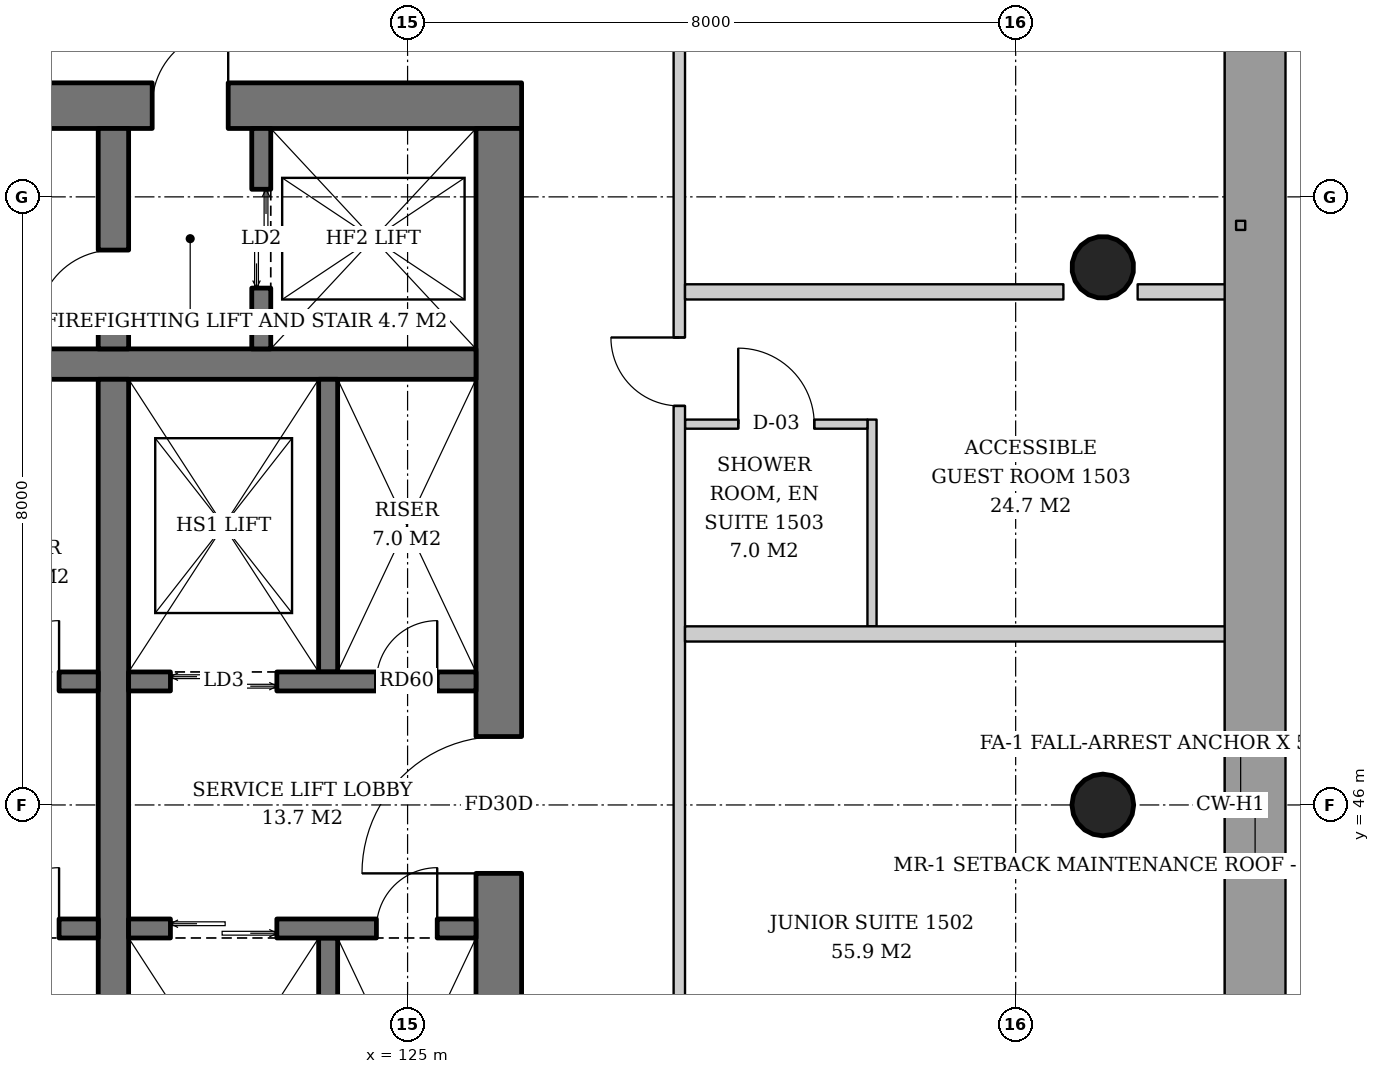
"""IFC4 building model, lengths in metres.
Left out: names, types, materials, properties, quantities, classifications, styles, units other than length and angle.
Written with IfcOpenShell. Run it as: python <this file> out.ifc"""

import sys

from ifc_helpers import new_model, si_unit, direction, frame, frame_2d, origin, origin_2d, place, context, subcontext, project, spatial, rectangle, hollow_circle, extrude, element, fill, save


model = new_model("IFC4")
c1 = context("Model", 3, precision=1e-05, world=origin(), true_north=direction((0.0, 1.0)))
c2 = subcontext(c1, "Body", "Model", "MODEL_VIEW")
j1 = project(units=[si_unit("LENGTHUNIT", "METRE"), si_unit("PLANEANGLEUNIT", "RADIAN")], contexts=[c1])
p1 = place(None, origin())
s1 = spatial("IfcSite", under=j1, at=p1, CompositionType="ELEMENT")
p2 = place(p1, origin())
s2 = spatial("IfcBuilding", under=s1, at=p2, CompositionType="ELEMENT")
p3 = place(p2, frame((0.0, 0.0, 62.8)))
s3 = spatial("IfcBuildingStorey", under=s2, at=p3, CompositionType="ELEMENT", Elevation=62.8)
p4 = place(p3, frame((134.198, 46.0, 0.0), z_axis=(-0.043069538298, 0.0, 0.999072076915), x_axis=(0.0, -1.0, 0.0)))
e1 = element("IfcColumn", 1, at=p4, inside=s3, PredefinedType="COLUMN", context=c2, shape_type="SweptSolid", body=[
    extrude(hollow_circle(Radius=0.406, WallThickness=0.03, at=origin_2d()), origin(), (0.0, 0.0, 1.0), 3.803),
])
p5 = place(p3, frame((134.198, 53.099, 0.0), z_axis=(-0.043059584825, -0.021497706284, 0.998841188968), x_axis=(0.446680166538, -0.894693706707, 0.0)))
e2 = element("IfcColumn", 2, at=p5, inside=s3, PredefinedType="COLUMN", context=c2, shape_type="SweptSolid", body=[
    extrude(hollow_circle(Radius=0.406, WallThickness=0.03, at=origin_2d()), origin(), (0.0, 0.0, 1.0), 3.804),
])
p6 = place(p3, frame((107.5, 55.2, 0.0), z_axis=(0.0, 0.0, 1.0), x_axis=(1.0, 0.0, 0.0)))
e3 = element("IfcWall", 3, at=p6, inside=s3, PredefinedType="SHEAR", context=c2, shape_type="SweptSolid", body=[
    extrude(rectangle(XDim=19.0, YDim=0.6, at=frame_2d((9.5, 0.0))), origin(), (0.0, 0.0, 1.0), 3.8),
])
p7 = place(p6, frame((14.14, 0.0, 0.0)))
e4 = element("IfcOpeningElement", 4, at=p7, cuts=e3, PredefinedType="OPENING", context=c2, shape_type="SweptSolid", body=[
    extrude(rectangle(XDim=1.0, YDim=2.1, at=frame_2d((0.5, 1.05))), frame((0.0, 0.31, 0.0), z_axis=(0.0, -1.0, 0.0), x_axis=(1.0, 0.0, 0.0)), (0.0, 0.0, 1.0), 0.62),
])
p8 = place(p6, frame((1.024, 0.0, 0.0)))
e5 = element("IfcOpeningElement", 5, at=p8, cuts=e3, PredefinedType="OPENING", context=c2, shape_type="SweptSolid", body=[
    extrude(rectangle(XDim=1.0, YDim=2.1, at=frame_2d((0.5, 1.05))), frame((0.0, 0.31, 0.0), z_axis=(0.0, -1.0, 0.0), x_axis=(1.0, 0.0, 0.0)), (0.0, 0.0, 1.0), 0.62),
])
p9 = place(p6, frame((3.262, 0.0, 0.0)))
e6 = element("IfcOpeningElement", 6, at=p9, cuts=e3, PredefinedType="OPENING", context=c2, shape_type="SweptSolid", body=[
    extrude(rectangle(XDim=1.0, YDim=2.1, at=frame_2d((0.5, 1.05))), frame((0.0, 0.31, 0.0), z_axis=(0.0, -1.0, 0.0), x_axis=(1.0, 0.0, 0.0)), (0.0, 0.0, 1.0), 0.62),
])
p10 = place(p3, frame((126.2, 37.1, 0.0), z_axis=(0.0, 0.0, 1.0), x_axis=(0.0, 1.0, 0.0)))
e7 = element("IfcWall", 7, at=p10, inside=s3, PredefinedType="SHEAR", context=c2, shape_type="SweptSolid", body=[
    extrude(rectangle(XDim=17.8, YDim=0.6, at=frame_2d((8.9, 0.0))), origin(), (0.0, 0.0, 1.0), 3.8),
])
p11 = place(p10, frame((8.0, 0.0, 0.0)))
e8 = element("IfcOpeningElement", 8, at=p11, cuts=e7, PredefinedType="OPENING", context=c2, shape_type="SweptSolid", body=[
    extrude(rectangle(XDim=1.8, YDim=2.4, at=frame_2d((0.9, 1.2))), frame((0.0, 0.31, 0.0), z_axis=(0.0, -1.0, 0.0), x_axis=(1.0, 0.0, 0.0)), (0.0, 0.0, 1.0), 0.62),
])
p12 = place(p3, frame((108.1, 51.8, 0.0), z_axis=(0.0, 0.0, 1.0), x_axis=(1.0, 0.0, 0.0)))
e9 = element("IfcWall", 9, at=p12, inside=s3, PredefinedType="SHEAR", context=c2, shape_type="SweptSolid", body=[
    extrude(rectangle(XDim=17.8, YDim=0.4, at=frame_2d((8.9, 0.0))), origin(), (0.0, 0.0, 1.0), 3.8),
])
p13 = place(p3, frame((121.13, 40.4, 0.0), z_axis=(0.0, 0.0, 1.0), x_axis=(0.0, 1.0, 0.0)))
e10 = element("IfcWall", 10, at=p13, inside=s3, PredefinedType="SHEAR", context=c2, shape_type="SweptSolid", body=[
    extrude(rectangle(XDim=11.2, YDim=0.4, at=frame_2d((5.6, 0.0))), origin(), (0.0, 0.0, 1.0), 3.8),
])
p14 = place(p3, frame((121.13, 52.0, 0.0), z_axis=(0.0, 0.0, 1.0), x_axis=(0.0, 1.0, 0.0)))
e11 = element("IfcWall", 11, at=p14, inside=s3, PredefinedType="SHEAR", context=c2, shape_type="SweptSolid", body=[
    extrude(rectangle(XDim=2.9, YDim=0.4, at=frame_2d((1.45, 0.0))), origin(), (0.0, 0.0, 1.0), 3.8),
])
p15 = place(p14, frame((0.3, 0.0, 0.0)))
e12 = element("IfcOpeningElement", 12, at=p15, cuts=e11, PredefinedType="OPENING", context=c2, shape_type="SweptSolid", body=[
    extrude(rectangle(XDim=1.0, YDim=2.1, at=frame_2d((0.5, 1.05))), frame((0.0, 0.21, 0.0), z_axis=(0.0, -1.0, 0.0), x_axis=(1.0, 0.0, 0.0)), (0.0, 0.0, 1.0), 0.42),
])
p16 = place(p3, frame((123.075, 52.0, 0.0), z_axis=(0.0, 0.0, 1.0), x_axis=(0.0, 1.0, 0.0)))
e13 = element("IfcWall", 13, at=p16, inside=s3, PredefinedType="SHEAR", context=c2, shape_type="SweptSolid", body=[
    extrude(rectangle(XDim=2.9, YDim=0.25, at=frame_2d((1.45, 0.0))), origin(), (0.0, 0.0, 1.0), 3.8),
])
p17 = place(p16, frame((0.8, 0.0, 0.0)))
e14 = element("IfcOpeningElement", 14, at=p17, cuts=e13, PredefinedType="OPENING", context=c2, shape_type="SweptSolid", body=[
    extrude(rectangle(XDim=1.3, YDim=2.2, at=frame_2d((0.65, 1.1))), frame((0.0, 0.135, 0.0), z_axis=(0.0, -1.0, 0.0), x_axis=(1.0, 0.0, 0.0)), (0.0, 0.0, 1.0), 0.27),
])
p18 = place(p3, frame((108.1, 47.625, 0.0), z_axis=(0.0, 0.0, 1.0), x_axis=(1.0, 0.0, 0.0)))
e15 = element("IfcWall", 15, at=p18, inside=s3, PredefinedType="SHEAR", context=c2, shape_type="SweptSolid", body=[
    extrude(rectangle(XDim=12.83, YDim=0.25, at=frame_2d((6.415, 0.0))), origin(), (0.0, 0.0, 1.0), 3.8),
])
p19 = place(p18, frame((0.7, 0.0, 0.0)))
e16 = element("IfcOpeningElement", 16, at=p19, cuts=e15, PredefinedType="OPENING", context=c2, shape_type="SweptSolid", body=[
    extrude(rectangle(XDim=1.1, YDim=2.2, at=frame_2d((0.55, 1.1))), frame((0.0, 0.135, 0.0), z_axis=(0.0, -1.0, 0.0), x_axis=(1.0, 0.0, 0.0)), (0.0, 0.0, 1.0), 0.27),
])
p20 = place(p18, frame((3.45, 0.0, 0.0)))
e17 = element("IfcOpeningElement", 17, at=p20, cuts=e15, PredefinedType="OPENING", context=c2, shape_type="SweptSolid", body=[
    extrude(rectangle(XDim=1.1, YDim=2.2, at=frame_2d((0.55, 1.1))), frame((0.0, 0.135, 0.0), z_axis=(0.0, -1.0, 0.0), x_axis=(1.0, 0.0, 0.0)), (0.0, 0.0, 1.0), 0.27),
])
p21 = place(p18, frame((6.2, 0.0, 0.0)))
e18 = element("IfcOpeningElement", 18, at=p21, cuts=e15, PredefinedType="OPENING", context=c2, shape_type="SweptSolid", body=[
    extrude(rectangle(XDim=1.1, YDim=2.2, at=frame_2d((0.55, 1.1))), frame((0.0, 0.135, 0.0), z_axis=(0.0, -1.0, 0.0), x_axis=(1.0, 0.0, 0.0)), (0.0, 0.0, 1.0), 0.27),
])
p22 = place(p18, frame((8.95, 0.0, 0.0)))
e19 = element("IfcOpeningElement", 19, at=p22, cuts=e15, PredefinedType="OPENING", context=c2, shape_type="SweptSolid", body=[
    extrude(rectangle(XDim=1.1, YDim=2.2, at=frame_2d((0.55, 1.1))), frame((0.0, 0.135, 0.0), z_axis=(0.0, -1.0, 0.0), x_axis=(1.0, 0.0, 0.0)), (0.0, 0.0, 1.0), 0.27),
])
p23 = place(p18, frame((11.515, 0.0, 0.0)))
e20 = element("IfcOpeningElement", 20, at=p23, cuts=e15, PredefinedType="OPENING", context=c2, shape_type="SweptSolid", body=[
    extrude(rectangle(XDim=0.8, YDim=2.0, at=frame_2d((0.4, 1.0))), frame((0.0, 0.135, 0.0), z_axis=(0.0, -1.0, 0.0), x_axis=(1.0, 0.0, 0.0)), (0.0, 0.0, 1.0), 0.27),
])
p24 = place(p3, frame((108.1, 44.375, 0.0), z_axis=(0.0, 0.0, 1.0), x_axis=(1.0, 0.0, 0.0)))
e21 = element("IfcWall", 21, at=p24, inside=s3, PredefinedType="SHEAR", context=c2, shape_type="SweptSolid", body=[
    extrude(rectangle(XDim=12.83, YDim=0.25, at=frame_2d((6.415, 0.0))), origin(), (0.0, 0.0, 1.0), 3.8),
])
p25 = place(p24, frame((0.7, 0.0, 0.0)))
e22 = element("IfcOpeningElement", 22, at=p25, cuts=e21, PredefinedType="OPENING", context=c2, shape_type="SweptSolid", body=[
    extrude(rectangle(XDim=1.1, YDim=2.2, at=frame_2d((0.55, 1.1))), frame((0.0, 0.135, 0.0), z_axis=(0.0, -1.0, 0.0), x_axis=(1.0, 0.0, 0.0)), (0.0, 0.0, 1.0), 0.27),
])
p26 = place(p24, frame((3.45, 0.0, 0.0)))
e23 = element("IfcOpeningElement", 23, at=p26, cuts=e21, PredefinedType="OPENING", context=c2, shape_type="SweptSolid", body=[
    extrude(rectangle(XDim=1.1, YDim=2.2, at=frame_2d((0.55, 1.1))), frame((0.0, 0.135, 0.0), z_axis=(0.0, -1.0, 0.0), x_axis=(1.0, 0.0, 0.0)), (0.0, 0.0, 1.0), 0.27),
])
p27 = place(p24, frame((6.2, 0.0, 0.0)))
e24 = element("IfcOpeningElement", 24, at=p27, cuts=e21, PredefinedType="OPENING", context=c2, shape_type="SweptSolid", body=[
    extrude(rectangle(XDim=1.1, YDim=2.2, at=frame_2d((0.55, 1.1))), frame((0.0, 0.135, 0.0), z_axis=(0.0, -1.0, 0.0), x_axis=(1.0, 0.0, 0.0)), (0.0, 0.0, 1.0), 0.27),
])
p28 = place(p24, frame((9.0, 0.0, 0.0)))
e25 = element("IfcOpeningElement", 25, at=p28, cuts=e21, PredefinedType="OPENING", context=c2, shape_type="SweptSolid", body=[
    extrude(rectangle(XDim=1.0, YDim=2.1, at=frame_2d((0.5, 1.05))), frame((0.0, 0.135, 0.0), z_axis=(0.0, -1.0, 0.0), x_axis=(1.0, 0.0, 0.0)), (0.0, 0.0, 1.0), 0.27),
])
p29 = place(p24, frame((11.515, 0.0, 0.0)))
e26 = element("IfcOpeningElement", 26, at=p29, cuts=e21, PredefinedType="OPENING", context=c2, shape_type="SweptSolid", body=[
    extrude(rectangle(XDim=0.8, YDim=2.0, at=frame_2d((0.4, 1.0))), frame((0.0, 0.135, 0.0), z_axis=(0.0, -1.0, 0.0), x_axis=(1.0, 0.0, 0.0)), (0.0, 0.0, 1.0), 0.27),
])
p30 = place(p3, frame((123.955, 47.75, 0.0), z_axis=(0.0, 0.0, 1.0), x_axis=(0.0, 1.0, 0.0)))
e27 = element("IfcWall", 27, at=p30, inside=s3, PredefinedType="SHEAR", context=c2, shape_type="SweptSolid", body=[
    extrude(rectangle(XDim=3.85, YDim=0.25, at=frame_2d((1.925, 0.0))), origin(), (0.0, 0.0, 1.0), 3.8),
])
p31 = place(p3, frame((121.33, 47.625, 0.0), z_axis=(0.0, 0.0, 1.0), x_axis=(1.0, 0.0, 0.0)))
e28 = element("IfcWall", 28, at=p31, inside=s3, PredefinedType="SHEAR", context=c2, shape_type="SweptSolid", body=[
    extrude(rectangle(XDim=4.57, YDim=0.25, at=frame_2d((2.285, 0.0))), origin(), (0.0, 0.0, 1.0), 3.8),
])
p32 = place(p31, frame((0.55, 0.0, 0.0)))
e29 = element("IfcOpeningElement", 29, at=p32, cuts=e28, PredefinedType="OPENING", context=c2, shape_type="SweptSolid", body=[
    extrude(rectangle(XDim=1.4, YDim=2.4, at=frame_2d((0.7, 1.2))), frame((0.0, 0.135, 0.0), z_axis=(0.0, -1.0, 0.0), x_axis=(1.0, 0.0, 0.0)), (0.0, 0.0, 1.0), 0.27),
])
p33 = place(p31, frame((3.26, 0.0, 0.0)))
e30 = element("IfcOpeningElement", 30, at=p33, cuts=e28, PredefinedType="OPENING", context=c2, shape_type="SweptSolid", body=[
    extrude(rectangle(XDim=0.8, YDim=2.0, at=frame_2d((0.4, 1.0))), frame((0.0, 0.135, 0.0), z_axis=(0.0, -1.0, 0.0), x_axis=(1.0, 0.0, 0.0)), (0.0, 0.0, 1.0), 0.27),
])
p34 = place(p3, frame((123.955, 44.25, 0.0), z_axis=(0.0, 0.0, 1.0), x_axis=(0.0, -1.0, 0.0)))
e31 = element("IfcWall", 31, at=p34, inside=s3, PredefinedType="SHEAR", context=c2, shape_type="SweptSolid", body=[
    extrude(rectangle(XDim=3.85, YDim=0.25, at=frame_2d((1.925, 0.0))), origin(), (0.0, 0.0, 1.0), 3.8),
])
p35 = place(p3, frame((121.33, 44.375, 0.0), z_axis=(0.0, 0.0, 1.0), x_axis=(1.0, 0.0, 0.0)))
e32 = element("IfcWall", 32, at=p35, inside=s3, PredefinedType="SHEAR", context=c2, shape_type="SweptSolid", body=[
    extrude(rectangle(XDim=4.57, YDim=0.25, at=frame_2d((2.285, 0.0))), origin(), (0.0, 0.0, 1.0), 3.8),
])
p36 = place(p35, frame((0.55, 0.0, 0.0)))
e33 = element("IfcOpeningElement", 33, at=p36, cuts=e32, PredefinedType="OPENING", context=c2, shape_type="SweptSolid", body=[
    extrude(rectangle(XDim=1.4, YDim=2.4, at=frame_2d((0.7, 1.2))), frame((0.0, 0.135, 0.0), z_axis=(0.0, -1.0, 0.0), x_axis=(1.0, 0.0, 0.0)), (0.0, 0.0, 1.0), 0.27),
])
p37 = place(p35, frame((3.26, 0.0, 0.0)))
e34 = element("IfcOpeningElement", 34, at=p37, cuts=e32, PredefinedType="OPENING", context=c2, shape_type="SweptSolid", body=[
    extrude(rectangle(XDim=0.8, YDim=2.0, at=frame_2d((0.4, 1.0))), frame((0.0, 0.135, 0.0), z_axis=(0.0, -1.0, 0.0), x_axis=(1.0, 0.0, 0.0)), (0.0, 0.0, 1.0), 0.27),
])
p38 = place(p3, frame((131.11, 48.35, 0.0), z_axis=(0.0, 0.0, 1.0), x_axis=(0.0, 1.0, 0.0)))
e35 = element("IfcWall", 35, at=p38, inside=s3, PredefinedType="PARTITIONING", context=c2, shape_type="SweptSolid", body=[
    extrude(rectangle(XDim=2.72, YDim=0.12, at=frame_2d((1.36, 0.0))), origin(), (0.0, 0.0, 1.0), 2.847),
])
p39 = place(p3, frame((128.65, 51.01, 0.0), z_axis=(0.0, 0.0, 1.0), x_axis=(1.0, 0.0, 0.0)))
e36 = element("IfcWall", 36, at=p39, inside=s3, PredefinedType="PARTITIONING", context=c2, shape_type="SweptSolid", body=[
    extrude(rectangle(XDim=2.4, YDim=0.12, at=frame_2d((1.2, 0.0))), origin(), (0.0, 0.0, 1.0), 3.6),
])
p40 = place(p39, frame((0.7, 0.0, 0.0)))
e37 = element("IfcOpeningElement", 37, at=p40, cuts=e36, PredefinedType="OPENING", context=c2, shape_type="SweptSolid", body=[
    extrude(rectangle(XDim=1.0, YDim=2.1, at=frame_2d((0.5, 1.05))), frame((0.0, 0.07, 0.0), z_axis=(0.0, -1.0, 0.0), x_axis=(1.0, 0.0, 0.0)), (0.0, 0.0, 1.0), 0.14),
])
p41 = place(p3, frame((128.575, 34.35, 0.0), z_axis=(0.0, 0.0, 1.0), x_axis=(0.0, 1.0, 0.0)))
e38 = element("IfcWall", 38, at=p41, inside=s3, PredefinedType="PARTITIONING", context=c2, shape_type="SweptSolid", body=[
    extrude(rectangle(XDim=23.15, YDim=0.15, at=frame_2d((11.575, 0.0))), origin(), (0.0, 0.0, 1.0), 2.8),
])
p42 = place(p41, frame((2.025, 0.0, 0.0)))
e39 = element("IfcOpeningElement", 39, at=p42, cuts=e38, PredefinedType="OPENING", context=c2, shape_type="SweptSolid", body=[
    extrude(rectangle(XDim=0.9, YDim=2.1, at=frame_2d((0.45, 1.05))), frame((0.0, 0.085, 0.0), z_axis=(0.0, -1.0, 0.0), x_axis=(1.0, 0.0, 0.0)), (0.0, 0.0, 1.0), 0.17),
])
p43 = place(p41, frame((7.65, 0.0, 0.0)))
e40 = element("IfcOpeningElement", 40, at=p43, cuts=e38, PredefinedType="OPENING", context=c2, shape_type="SweptSolid", body=[
    extrude(rectangle(XDim=0.9, YDim=2.1, at=frame_2d((0.45, 1.05))), frame((0.0, 0.085, 0.0), z_axis=(0.0, -1.0, 0.0), x_axis=(1.0, 0.0, 0.0)), (0.0, 0.0, 1.0), 0.17),
])
p44 = place(p41, frame((16.9, 0.0, 0.0)))
e41 = element("IfcOpeningElement", 41, at=p44, cuts=e38, PredefinedType="OPENING", context=c2, shape_type="SweptSolid", body=[
    extrude(rectangle(XDim=0.9, YDim=2.1, at=frame_2d((0.45, 1.05))), frame((0.0, 0.085, 0.0), z_axis=(0.0, -1.0, 0.0), x_axis=(1.0, 0.0, 0.0)), (0.0, 0.0, 1.0), 0.17),
])
p45 = place(p3, frame((128.65, 48.25, 0.0), z_axis=(0.0, 0.0, 1.0), x_axis=(1.0, 0.0, 0.0)))
e42 = element("IfcWall", 42, at=p45, inside=s3, PredefinedType="PARTITIONING", context=c2, shape_type="SweptSolid", body=[
    extrude(rectangle(XDim=7.14, YDim=0.2, at=frame_2d((3.57, 0.0))), origin(), (0.0, 0.0, 1.0), 3.05),
])
p46 = place(p3, frame((128.65, 52.75, 0.0), z_axis=(0.0, 0.0, 1.0), x_axis=(1.0, 0.0, 0.0)))
e43 = element("IfcWall", 43, at=p46, inside=s3, PredefinedType="PARTITIONING", context=c2, shape_type="SweptSolid", body=[
    extrude(rectangle(XDim=4.978, YDim=0.2, at=frame_2d((2.489, 0.0))), origin(), (0.0, 0.0, 1.0), 3.6),
])
p47 = place(p3, frame((134.605, 52.75, 0.0), z_axis=(0.0, 0.0, 1.0), x_axis=(1.0, 0.0, 0.0)))
e44 = element("IfcWall", 44, at=p47, inside=s3, PredefinedType="PARTITIONING", context=c2, shape_type="SweptSolid", body=[
    extrude(rectangle(XDim=1.185, YDim=0.2, at=frame_2d((0.593, 0.0))), origin(), (0.0, 0.0, 1.0), 3.6),
])
p48 = place(p17, origin())
e45 = element("IfcDoor", 45, at=p48, inside=s3, OperationType="DOUBLE_DOOR_SLIDING", PredefinedType="DOOR", context=c2, shape_type="SweptSolid", body=[
    extrude(rectangle(XDim=1.3, YDim=2.2, at=frame_2d((0.65, 1.1))), frame((0.0, 0.025, 0.0), z_axis=(0.0, -1.0, 0.0), x_axis=(1.0, 0.0, 0.0)), (0.0, 0.0, 1.0), 0.05),
])
fill(e14, e45)
p49 = place(p23, origin())
e46 = element("IfcDoor", 46, at=p49, inside=s3, OperationType="SINGLE_SWING_RIGHT", PredefinedType="DOOR", context=c2, shape_type="SweptSolid", body=[
    extrude(rectangle(XDim=0.8, YDim=2.0, at=frame_2d((0.4, 1.0))), frame((0.0, 0.025, 0.0), z_axis=(0.0, -1.0, 0.0), x_axis=(1.0, 0.0, 0.0)), (0.0, 0.0, 1.0), 0.05),
])
fill(e20, e46)
p50 = place(p29, origin())
e47 = element("IfcDoor", 47, at=p50, inside=s3, OperationType="SINGLE_SWING_RIGHT", PredefinedType="DOOR", context=c2, shape_type="SweptSolid", body=[
    extrude(rectangle(XDim=0.8, YDim=2.0, at=frame_2d((0.4, 1.0))), frame((0.0, 0.025, 0.0), z_axis=(0.0, -1.0, 0.0), x_axis=(1.0, 0.0, 0.0)), (0.0, 0.0, 1.0), 0.05),
])
fill(e26, e47)
p51 = place(p32, origin())
e48 = element("IfcDoor", 48, at=p51, inside=s3, OperationType="DOUBLE_DOOR_SLIDING", PredefinedType="DOOR", context=c2, shape_type="SweptSolid", body=[
    extrude(rectangle(XDim=1.4, YDim=2.4, at=frame_2d((0.7, 1.2))), frame((0.0, 0.025, 0.0), z_axis=(0.0, -1.0, 0.0), x_axis=(1.0, 0.0, 0.0)), (0.0, 0.0, 1.0), 0.05),
])
fill(e29, e48)
p52 = place(p33, origin())
e49 = element("IfcDoor", 49, at=p52, inside=s3, OperationType="SINGLE_SWING_RIGHT", PredefinedType="DOOR", context=c2, shape_type="SweptSolid", body=[
    extrude(rectangle(XDim=0.8, YDim=2.0, at=frame_2d((0.4, 1.0))), frame((0.0, 0.025, 0.0), z_axis=(0.0, -1.0, 0.0), x_axis=(1.0, 0.0, 0.0)), (0.0, 0.0, 1.0), 0.05),
])
fill(e30, e49)
p53 = place(p36, origin())
e50 = element("IfcDoor", 50, at=p53, inside=s3, OperationType="DOUBLE_DOOR_SLIDING", PredefinedType="DOOR", context=c2, shape_type="SweptSolid", body=[
    extrude(rectangle(XDim=1.4, YDim=2.4, at=frame_2d((0.7, 1.2))), frame((0.0, 0.025, 0.0), z_axis=(0.0, -1.0, 0.0), x_axis=(1.0, 0.0, 0.0)), (0.0, 0.0, 1.0), 0.05),
])
fill(e33, e50)
p54 = place(p37, origin())
e51 = element("IfcDoor", 51, at=p54, inside=s3, OperationType="SINGLE_SWING_RIGHT", PredefinedType="DOOR", context=c2, shape_type="SweptSolid", body=[
    extrude(rectangle(XDim=0.8, YDim=2.0, at=frame_2d((0.4, 1.0))), frame((0.0, 0.025, 0.0), z_axis=(0.0, -1.0, 0.0), x_axis=(1.0, 0.0, 0.0)), (0.0, 0.0, 1.0), 0.05),
])
fill(e34, e51)
p55 = place(p15, origin())
e52 = element("IfcDoor", 52, at=p55, inside=s3, OperationType="SINGLE_SWING_LEFT", PredefinedType="DOOR", context=c2, shape_type="SweptSolid", body=[
    extrude(rectangle(XDim=1.0, YDim=2.1, at=frame_2d((0.5, 1.05))), frame((0.0, 0.025, 0.0), z_axis=(0.0, -1.0, 0.0), x_axis=(1.0, 0.0, 0.0)), (0.0, 0.0, 1.0), 0.05),
])
fill(e12, e52)
p56 = place(p7, origin())
e53 = element("IfcDoor", 53, at=p56, inside=s3, OperationType="SINGLE_SWING_RIGHT", PredefinedType="DOOR", context=c2, shape_type="SweptSolid", body=[
    extrude(rectangle(XDim=1.0, YDim=2.1, at=frame_2d((0.5, 1.05))), frame((0.0, 0.025, 0.0), z_axis=(0.0, -1.0, 0.0), x_axis=(1.0, 0.0, 0.0)), (0.0, 0.0, 1.0), 0.05),
])
fill(e4, e53)
p57 = place(p11, origin())
e54 = element("IfcDoor", 54, at=p57, inside=s3, OperationType="DOUBLE_DOOR_SINGLE_SWING", PredefinedType="DOOR", context=c2, shape_type="SweptSolid", body=[
    extrude(rectangle(XDim=1.8, YDim=2.4, at=frame_2d((0.9, 1.2))), frame((0.0, 0.025, 0.0), z_axis=(0.0, -1.0, 0.0), x_axis=(1.0, 0.0, 0.0)), (0.0, 0.0, 1.0), 0.05),
])
fill(e8, e54)
p58 = place(p40, origin())
e55 = element("IfcDoor", 55, at=p58, inside=s3, OperationType="SINGLE_SWING_LEFT", PredefinedType="DOOR", context=c2, shape_type="SweptSolid", body=[
    extrude(rectangle(XDim=1.0, YDim=2.1, at=frame_2d((0.5, 1.05))), frame((0.0, 0.025, 0.0), z_axis=(0.0, -1.0, 0.0), x_axis=(1.0, 0.0, 0.0)), (0.0, 0.0, 1.0), 0.05),
])
fill(e37, e55)
p59 = place(p44, origin())
e56 = element("IfcDoor", 56, at=p59, inside=s3, OperationType="SINGLE_SWING_RIGHT", PredefinedType="DOOR", context=c2, shape_type="SweptSolid", body=[
    extrude(rectangle(XDim=0.9, YDim=2.1, at=frame_2d((0.45, 1.05))), frame((0.0, 0.025, 0.0), z_axis=(0.0, -1.0, 0.0), x_axis=(1.0, 0.0, 0.0)), (0.0, 0.0, 1.0), 0.05),
])
fill(e41, e56)
save(model, sys.argv[1])
